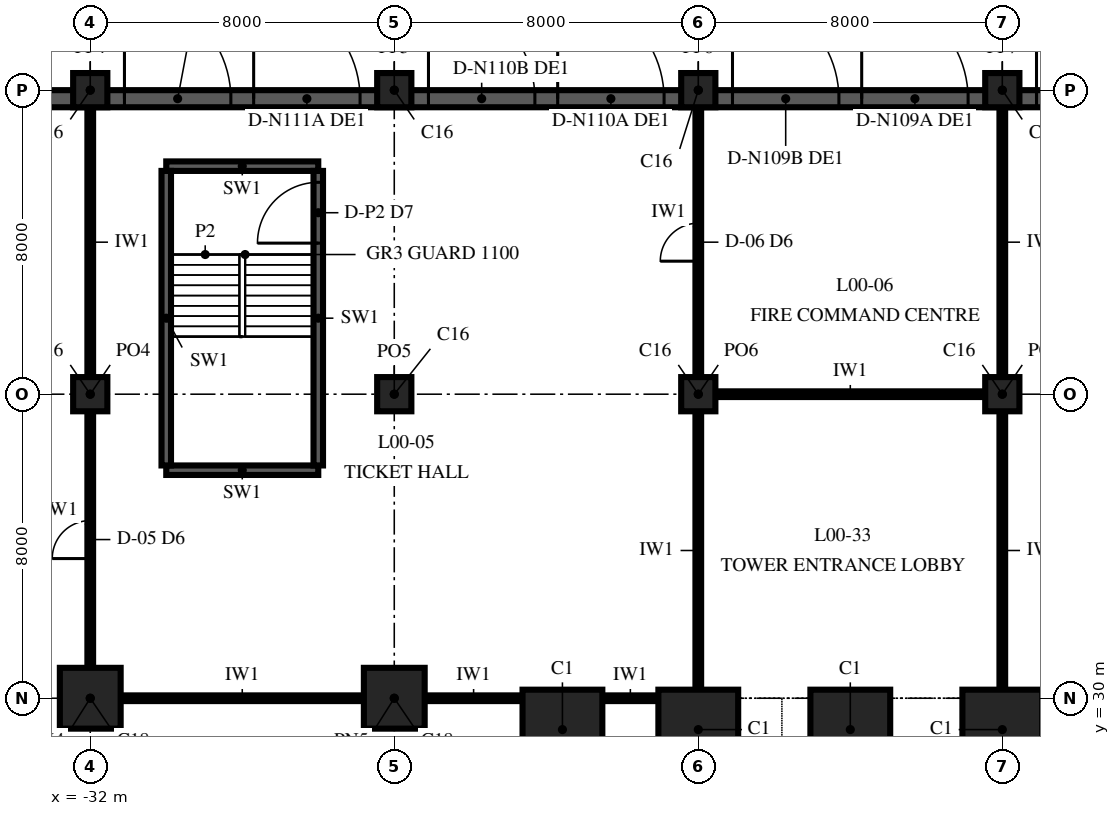
"""IFC4 building model, lengths in metres.
Left out: names, types, materials, properties, quantities, classifications, styles, units other than length and angle.
Written with IfcOpenShell. Run it as: python <this file> out.ifc"""

import sys

from ifc_helpers import new_model, si_unit, direction, frame, frame_2d, origin, origin_2d, place, context, subcontext, project, spatial, rectangle, extrude, element, fill, save


model = new_model("IFC4")
c1 = context("Model", 3, precision=1e-05, world=origin(), true_north=direction((0.0, 1.0)))
c2 = subcontext(c1, "Body", "Model", "MODEL_VIEW")
j1 = project(units=[si_unit("LENGTHUNIT", "METRE"), si_unit("PLANEANGLEUNIT", "RADIAN")], contexts=[c1])
p1 = place(None, origin())
s1 = spatial("IfcSite", under=j1, at=p1, CompositionType="ELEMENT")
p2 = place(p1, origin())
s2 = spatial("IfcBuilding", under=s1, at=p2, CompositionType="ELEMENT")
p3 = place(p2, origin())
s3 = spatial("IfcBuildingStorey", under=s2, at=p3, CompositionType="ELEMENT", Elevation=0.0)
for number, where, z_axis, x_axis in (
    (1, (-8.0, 29.175, 0.0), (0.0, 0.0, 1.0), (-1.0, 0.0, 0.0)),
    (2, (-12.0, 29.175, 0.0), (0.0, 0.0, 1.0), (-1.0, 0.0, 0.0)),
    (3, (-16.0, 29.175, 0.0), (0.0, 0.0, 1.0), (-1.0, 0.0, 0.0)),
    (4, (-19.575, 29.175, 0.0), (0.0, 0.0, 1.0), (-1.0, 0.0, 0.0)),
):
    element("IfcColumn", number, at=place(p3, frame(where, z_axis=z_axis, x_axis=x_axis)), inside=s3, PredefinedType="COLUMN", context=c2, shape_type="SweptSolid", body=[
        extrude(rectangle(XDim=2.1, YDim=2.1, at=origin_2d()), origin(), (0.0, 0.0, 1.0), 6.0),
    ])
p4 = place(p3, frame((-32.0, 30.0, 0.0), z_axis=(0.0, 0.0, 1.0), x_axis=(1.0, 0.0, 0.0)))
e5 = element("IfcColumn", 5, at=p4, inside=s3, PredefinedType="COLUMN", context=c2, shape_type="SweptSolid", body=[
    extrude(rectangle(XDim=1.6, YDim=1.6, at=origin_2d()), origin(), (0.0, 0.0, 1.0), 6.0),
])
for number, where, z_axis, x_axis in (
    (6, (-32.0, 38.0, 0.0), (0.0, 0.0, 1.0), (1.0, 0.0, 0.0)),
    (7, (-32.0, 46.0, 0.0), (0.0, 0.0, 1.0), (1.0, 0.0, 0.0)),
):
    element("IfcColumn", number, at=place(p3, frame(where, z_axis=z_axis, x_axis=x_axis)), inside=s3, PredefinedType="COLUMN", context=c2, shape_type="SweptSolid", body=[
        extrude(rectangle(XDim=0.9, YDim=0.9, at=origin_2d()), origin(), (0.0, 0.0, 1.0), 6.0),
    ])
p5 = place(p3, frame((-24.0, 30.0, 0.0), z_axis=(0.0, 0.0, 1.0), x_axis=(1.0, 0.0, 0.0)))
e8 = element("IfcColumn", 8, at=p5, inside=s3, PredefinedType="COLUMN", context=c2, shape_type="SweptSolid", body=[
    extrude(rectangle(XDim=1.6, YDim=1.6, at=origin_2d()), origin(), (0.0, 0.0, 1.0), 6.0),
])
for number, where, z_axis, x_axis in (
    (9, (-24.0, 38.0, 0.0), (0.0, 0.0, 1.0), (1.0, 0.0, 0.0)),
    (10, (-24.0, 46.0, 0.0), (0.0, 0.0, 1.0), (1.0, 0.0, 0.0)),
    (11, (-16.0, 38.0, 0.0), (0.0, 0.0, 1.0), (1.0, 0.0, 0.0)),
    (12, (-16.0, 46.0, 0.0), (0.0, 0.0, 1.0), (1.0, 0.0, 0.0)),
    (13, (-8.0, 38.0, 0.0), (0.0, 0.0, 1.0), (1.0, 0.0, 0.0)),
    (14, (-8.0, 46.0, 0.0), (0.0, 0.0, 1.0), (1.0, 0.0, 0.0)),
):
    element("IfcColumn", number, at=place(p3, frame(where, z_axis=z_axis, x_axis=x_axis)), inside=s3, PredefinedType="COLUMN", context=c2, shape_type="SweptSolid", body=[
        extrude(rectangle(XDim=0.9, YDim=0.9, at=origin_2d()), origin(), (0.0, 0.0, 1.0), 6.0),
    ])
p6 = place(p3, frame((56.0, 45.775, 0.0), z_axis=(0.0, 0.0, 1.0), x_axis=(-1.0, 0.0, 0.0)))
e15 = element("IfcWall", 15, at=p6, inside=s3, PredefinedType="SOLIDWALL", context=c2, shape_type="SweptSolid", body=[
    extrude(rectangle(XDim=90.0, YDim=0.45, at=frame_2d((45.0, 0.0))), origin(), (0.0, 0.0, 1.0), 6.0),
])
p7 = place(p6, frame((0.9, 0.0, 0.0)))
e16 = element("IfcOpeningElement", 16, at=p7, cuts=e15, PredefinedType="OPENING", context=c2, shape_type="SweptSolid", body=[
    extrude(rectangle(XDim=2.8, YDim=2.4, at=frame_2d((1.4, 1.2))), frame((0.0, 0.24, 0.0), z_axis=(0.0, -1.0, 0.0), x_axis=(1.0, 0.0, 0.0)), (0.0, 0.0, 1.0), 0.48),
])
p8 = place(p6, frame((4.3, 0.0, 0.0)))
e17 = element("IfcOpeningElement", 17, at=p8, cuts=e15, PredefinedType="OPENING", context=c2, shape_type="SweptSolid", body=[
    extrude(rectangle(XDim=2.8, YDim=2.4, at=frame_2d((1.4, 1.2))), frame((0.0, 0.24, 0.0), z_axis=(0.0, -1.0, 0.0), x_axis=(1.0, 0.0, 0.0)), (0.0, 0.0, 1.0), 0.48),
])
p9 = place(p6, frame((8.9, 0.0, 0.0)))
e18 = element("IfcOpeningElement", 18, at=p9, cuts=e15, PredefinedType="OPENING", context=c2, shape_type="SweptSolid", body=[
    extrude(rectangle(XDim=2.8, YDim=2.4, at=frame_2d((1.4, 1.2))), frame((0.0, 0.24, 0.0), z_axis=(0.0, -1.0, 0.0), x_axis=(1.0, 0.0, 0.0)), (0.0, 0.0, 1.0), 0.48),
])
p10 = place(p6, frame((12.3, 0.0, 0.0)))
e19 = element("IfcOpeningElement", 19, at=p10, cuts=e15, PredefinedType="OPENING", context=c2, shape_type="SweptSolid", body=[
    extrude(rectangle(XDim=2.8, YDim=2.4, at=frame_2d((1.4, 1.2))), frame((0.0, 0.24, 0.0), z_axis=(0.0, -1.0, 0.0), x_axis=(1.0, 0.0, 0.0)), (0.0, 0.0, 1.0), 0.48),
])
p11 = place(p6, frame((16.9, 0.0, 0.0)))
e20 = element("IfcOpeningElement", 20, at=p11, cuts=e15, PredefinedType="OPENING", context=c2, shape_type="SweptSolid", body=[
    extrude(rectangle(XDim=2.8, YDim=2.4, at=frame_2d((1.4, 1.2))), frame((0.0, 0.24, 0.0), z_axis=(0.0, -1.0, 0.0), x_axis=(1.0, 0.0, 0.0)), (0.0, 0.0, 1.0), 0.48),
])
p12 = place(p6, frame((20.3, 0.0, 0.0)))
e21 = element("IfcOpeningElement", 21, at=p12, cuts=e15, PredefinedType="OPENING", context=c2, shape_type="SweptSolid", body=[
    extrude(rectangle(XDim=2.8, YDim=2.4, at=frame_2d((1.4, 1.2))), frame((0.0, 0.24, 0.0), z_axis=(0.0, -1.0, 0.0), x_axis=(1.0, 0.0, 0.0)), (0.0, 0.0, 1.0), 0.48),
])
p13 = place(p6, frame((24.9, 0.0, 0.0)))
e22 = element("IfcOpeningElement", 22, at=p13, cuts=e15, PredefinedType="OPENING", context=c2, shape_type="SweptSolid", body=[
    extrude(rectangle(XDim=2.8, YDim=2.4, at=frame_2d((1.4, 1.2))), frame((0.0, 0.24, 0.0), z_axis=(0.0, -1.0, 0.0), x_axis=(1.0, 0.0, 0.0)), (0.0, 0.0, 1.0), 0.48),
])
p14 = place(p6, frame((28.3, 0.0, 0.0)))
e23 = element("IfcOpeningElement", 23, at=p14, cuts=e15, PredefinedType="OPENING", context=c2, shape_type="SweptSolid", body=[
    extrude(rectangle(XDim=2.8, YDim=2.4, at=frame_2d((1.4, 1.2))), frame((0.0, 0.24, 0.0), z_axis=(0.0, -1.0, 0.0), x_axis=(1.0, 0.0, 0.0)), (0.0, 0.0, 1.0), 0.48),
])
p15 = place(p6, frame((32.9, 0.0, 0.0)))
e24 = element("IfcOpeningElement", 24, at=p15, cuts=e15, PredefinedType="OPENING", context=c2, shape_type="SweptSolid", body=[
    extrude(rectangle(XDim=2.8, YDim=2.4, at=frame_2d((1.4, 1.2))), frame((0.0, 0.24, 0.0), z_axis=(0.0, -1.0, 0.0), x_axis=(1.0, 0.0, 0.0)), (0.0, 0.0, 1.0), 0.48),
])
p16 = place(p6, frame((36.3, 0.0, 0.0)))
e25 = element("IfcOpeningElement", 25, at=p16, cuts=e15, PredefinedType="OPENING", context=c2, shape_type="SweptSolid", body=[
    extrude(rectangle(XDim=2.8, YDim=2.4, at=frame_2d((1.4, 1.2))), frame((0.0, 0.24, 0.0), z_axis=(0.0, -1.0, 0.0), x_axis=(1.0, 0.0, 0.0)), (0.0, 0.0, 1.0), 0.48),
])
p17 = place(p6, frame((40.9, 0.0, 0.0)))
e26 = element("IfcOpeningElement", 26, at=p17, cuts=e15, PredefinedType="OPENING", context=c2, shape_type="SweptSolid", body=[
    extrude(rectangle(XDim=2.8, YDim=2.4, at=frame_2d((1.4, 1.2))), frame((0.0, 0.24, 0.0), z_axis=(0.0, -1.0, 0.0), x_axis=(1.0, 0.0, 0.0)), (0.0, 0.0, 1.0), 0.48),
])
p18 = place(p6, frame((44.3, 0.0, 0.0)))
e27 = element("IfcOpeningElement", 27, at=p18, cuts=e15, PredefinedType="OPENING", context=c2, shape_type="SweptSolid", body=[
    extrude(rectangle(XDim=2.8, YDim=2.4, at=frame_2d((1.4, 1.2))), frame((0.0, 0.24, 0.0), z_axis=(0.0, -1.0, 0.0), x_axis=(1.0, 0.0, 0.0)), (0.0, 0.0, 1.0), 0.48),
])
p19 = place(p6, frame((48.9, 0.0, 0.0)))
e28 = element("IfcOpeningElement", 28, at=p19, cuts=e15, PredefinedType="OPENING", context=c2, shape_type="SweptSolid", body=[
    extrude(rectangle(XDim=2.8, YDim=2.4, at=frame_2d((1.4, 1.2))), frame((0.0, 0.24, 0.0), z_axis=(0.0, -1.0, 0.0), x_axis=(1.0, 0.0, 0.0)), (0.0, 0.0, 1.0), 0.48),
])
p20 = place(p6, frame((52.3, 0.0, 0.0)))
e29 = element("IfcOpeningElement", 29, at=p20, cuts=e15, PredefinedType="OPENING", context=c2, shape_type="SweptSolid", body=[
    extrude(rectangle(XDim=2.8, YDim=2.4, at=frame_2d((1.4, 1.2))), frame((0.0, 0.24, 0.0), z_axis=(0.0, -1.0, 0.0), x_axis=(1.0, 0.0, 0.0)), (0.0, 0.0, 1.0), 0.48),
])
p21 = place(p6, frame((56.9, 0.0, 0.0)))
e30 = element("IfcOpeningElement", 30, at=p21, cuts=e15, PredefinedType="OPENING", context=c2, shape_type="SweptSolid", body=[
    extrude(rectangle(XDim=2.8, YDim=2.4, at=frame_2d((1.4, 1.2))), frame((0.0, 0.24, 0.0), z_axis=(0.0, -1.0, 0.0), x_axis=(1.0, 0.0, 0.0)), (0.0, 0.0, 1.0), 0.48),
])
p22 = place(p6, frame((60.3, 0.0, 0.0)))
e31 = element("IfcOpeningElement", 31, at=p22, cuts=e15, PredefinedType="OPENING", context=c2, shape_type="SweptSolid", body=[
    extrude(rectangle(XDim=2.8, YDim=2.4, at=frame_2d((1.4, 1.2))), frame((0.0, 0.24, 0.0), z_axis=(0.0, -1.0, 0.0), x_axis=(1.0, 0.0, 0.0)), (0.0, 0.0, 1.0), 0.48),
])
p23 = place(p6, frame((64.9, 0.0, 0.0)))
e32 = element("IfcOpeningElement", 32, at=p23, cuts=e15, PredefinedType="OPENING", context=c2, shape_type="SweptSolid", body=[
    extrude(rectangle(XDim=2.8, YDim=2.4, at=frame_2d((1.4, 1.2))), frame((0.0, 0.24, 0.0), z_axis=(0.0, -1.0, 0.0), x_axis=(1.0, 0.0, 0.0)), (0.0, 0.0, 1.0), 0.48),
])
p24 = place(p6, frame((68.3, 0.0, 0.0)))
e33 = element("IfcOpeningElement", 33, at=p24, cuts=e15, PredefinedType="OPENING", context=c2, shape_type="SweptSolid", body=[
    extrude(rectangle(XDim=2.8, YDim=2.4, at=frame_2d((1.4, 1.2))), frame((0.0, 0.24, 0.0), z_axis=(0.0, -1.0, 0.0), x_axis=(1.0, 0.0, 0.0)), (0.0, 0.0, 1.0), 0.48),
])
p25 = place(p6, frame((72.9, 0.0, 0.0)))
e34 = element("IfcOpeningElement", 34, at=p25, cuts=e15, PredefinedType="OPENING", context=c2, shape_type="SweptSolid", body=[
    extrude(rectangle(XDim=2.8, YDim=2.4, at=frame_2d((1.4, 1.2))), frame((0.0, 0.24, 0.0), z_axis=(0.0, -1.0, 0.0), x_axis=(1.0, 0.0, 0.0)), (0.0, 0.0, 1.0), 0.48),
])
p26 = place(p6, frame((76.3, 0.0, 0.0)))
e35 = element("IfcOpeningElement", 35, at=p26, cuts=e15, PredefinedType="OPENING", context=c2, shape_type="SweptSolid", body=[
    extrude(rectangle(XDim=2.8, YDim=2.4, at=frame_2d((1.4, 1.2))), frame((0.0, 0.24, 0.0), z_axis=(0.0, -1.0, 0.0), x_axis=(1.0, 0.0, 0.0)), (0.0, 0.0, 1.0), 0.48),
])
p27 = place(p6, frame((80.9, 0.0, 0.0)))
e36 = element("IfcOpeningElement", 36, at=p27, cuts=e15, PredefinedType="OPENING", context=c2, shape_type="SweptSolid", body=[
    extrude(rectangle(XDim=2.8, YDim=2.4, at=frame_2d((1.4, 1.2))), frame((0.0, 0.24, 0.0), z_axis=(0.0, -1.0, 0.0), x_axis=(1.0, 0.0, 0.0)), (0.0, 0.0, 1.0), 0.48),
])
p28 = place(p6, frame((84.3, 0.0, 0.0)))
e37 = element("IfcOpeningElement", 37, at=p28, cuts=e15, PredefinedType="OPENING", context=c2, shape_type="SweptSolid", body=[
    extrude(rectangle(XDim=2.8, YDim=2.4, at=frame_2d((1.4, 1.2))), frame((0.0, 0.24, 0.0), z_axis=(0.0, -1.0, 0.0), x_axis=(1.0, 0.0, 0.0)), (0.0, 0.0, 1.0), 0.48),
])
for number, where, z_axis, x_axis in (
    (38, (-30.0, 36.0, 0.0), (0.0, 0.0, 1.0), (1.0, 0.0, 0.0)),
    (39, (-26.0, 44.0, 0.0), (0.0, 0.0, 1.0), (-1.0, 0.0, 0.0)),
):
    element("IfcWall", number, at=place(p3, frame(where, z_axis=z_axis, x_axis=x_axis)), inside=s3, PredefinedType="SOLIDWALL", context=c2, shape_type="SweptSolid", body=[
        extrude(rectangle(XDim=4.0, YDim=0.25, at=frame_2d((2.0, 0.0))), origin(), (0.0, 0.0, 1.0), 6.0),
    ])
p29 = place(p3, frame((-26.0, 36.125, 0.0), z_axis=(0.0, 0.0, 1.0), x_axis=(0.0, 1.0, 0.0)))
e40 = element("IfcWall", 40, at=p29, inside=s3, PredefinedType="SOLIDWALL", context=c2, shape_type="SweptSolid", body=[
    extrude(rectangle(XDim=7.75, YDim=0.25, at=frame_2d((3.875, 0.0))), origin(), (0.0, 0.0, 1.0), 6.0),
])
p30 = place(p29, frame((5.85, 0.0, 0.0)))
e41 = element("IfcOpeningElement", 41, at=p30, cuts=e40, PredefinedType="OPENING", context=c2, shape_type="SweptSolid", body=[
    extrude(rectangle(XDim=1.6, YDim=2.1, at=frame_2d((0.8, 1.05))), frame((0.0, 0.14, 0.0), z_axis=(0.0, -1.0, 0.0), x_axis=(1.0, 0.0, 0.0)), (0.0, 0.0, 1.0), 0.28),
])
p31 = place(p3, frame((-30.0, 43.875, 0.0), z_axis=(0.0, 0.0, 1.0), x_axis=(0.0, -1.0, 0.0)))
e42 = element("IfcWall", 42, at=p31, inside=s3, PredefinedType="SOLIDWALL", context=c2, shape_type="SweptSolid", body=[
    extrude(rectangle(XDim=7.75, YDim=0.25, at=frame_2d((3.875, 0.0))), origin(), (0.0, 0.0, 1.0), 6.0),
])
p32 = place(p3, frame((-32.0, 30.81, 0.0), z_axis=(0.0, 0.0, 1.0), x_axis=(0.0, 1.0, 0.0)))
e43 = element("IfcWall", 43, at=p32, inside=s3, PredefinedType="PARTITIONING", context=c2, shape_type="SweptSolid", body=[
    extrude(rectangle(XDim=6.73, YDim=0.15, at=frame_2d((3.365, 0.0))), origin(), (0.0, 0.0, 1.0), 5.05),
])
p33 = place(p32, frame((2.865, 0.0, 0.0)))
e44 = element("IfcOpeningElement", 44, at=p33, cuts=e43, PredefinedType="OPENING", context=c2, shape_type="SweptSolid", body=[
    extrude(rectangle(XDim=1.0, YDim=2.1, at=frame_2d((0.5, 1.05))), frame((0.0, 0.09, 0.0), z_axis=(0.0, -1.0, 0.0), x_axis=(1.0, 0.0, 0.0)), (0.0, 0.0, 1.0), 0.18),
])
p34 = place(p3, frame((-32.0, 38.46, 0.0), z_axis=(0.0, 0.0, 1.0), x_axis=(0.0, 1.0, 0.0)))
e45 = element("IfcWall", 45, at=p34, inside=s3, PredefinedType="PARTITIONING", context=c2, shape_type="SweptSolid", body=[
    extrude(rectangle(XDim=7.08, YDim=0.15, at=frame_2d((3.54, 0.0))), origin(), (0.0, 0.0, 1.0), 5.05),
])
p35 = place(p3, frame((-16.0, 30.235, 0.0), z_axis=(0.0, 0.0, 1.0), x_axis=(0.0, 1.0, 0.0)))
e46 = element("IfcWall", 46, at=p35, inside=s3, PredefinedType="PARTITIONING", context=c2, shape_type="SweptSolid", body=[
    extrude(rectangle(XDim=7.305, YDim=0.15, at=frame_2d((3.652, 0.0))), origin(), (0.0, 0.0, 1.0), 5.7),
])
p36 = place(p3, frame((-16.0, 38.46, 0.0), z_axis=(0.0, 0.0, 1.0), x_axis=(0.0, 1.0, 0.0)))
e47 = element("IfcWall", 47, at=p36, inside=s3, PredefinedType="PARTITIONING", context=c2, shape_type="SweptSolid", body=[
    extrude(rectangle(XDim=7.08, YDim=0.15, at=frame_2d((3.54, 0.0))), origin(), (0.0, 0.0, 1.0), 5.05),
])
p37 = place(p36, frame((3.04, 0.0, 0.0)))
e48 = element("IfcOpeningElement", 48, at=p37, cuts=e47, PredefinedType="OPENING", context=c2, shape_type="SweptSolid", body=[
    extrude(rectangle(XDim=1.0, YDim=2.1, at=frame_2d((0.5, 1.05))), frame((0.0, 0.09, 0.0), z_axis=(0.0, -1.0, 0.0), x_axis=(1.0, 0.0, 0.0)), (0.0, 0.0, 1.0), 0.18),
])
p38 = place(p3, frame((-31.19, 30.0, 0.0), z_axis=(0.0, 0.0, 1.0), x_axis=(1.0, 0.0, 0.0)))
e49 = element("IfcWall", 49, at=p38, inside=s3, PredefinedType="PARTITIONING", context=c2, shape_type="SweptSolid", body=[
    extrude(rectangle(XDim=6.38, YDim=0.15, at=frame_2d((3.19, 0.0))), origin(), (0.0, 0.0, 1.0), 5.05),
])
p39 = place(p3, frame((-23.19, 30.0, 0.0), z_axis=(0.0, 0.0, 1.0), x_axis=(1.0, 0.0, 0.0)))
e50 = element("IfcWall", 50, at=p39, inside=s3, PredefinedType="PARTITIONING", context=c2, shape_type="SweptSolid", body=[
    extrude(rectangle(XDim=2.555, YDim=0.15, at=frame_2d((1.277, 0.0))), origin(), (0.0, 0.0, 1.0), 5.7),
])
p40 = place(p3, frame((-18.515, 30.0, 0.0), z_axis=(0.0, 0.0, 1.0), x_axis=(1.0, 0.0, 0.0)))
e51 = element("IfcWall", 51, at=p40, inside=s3, PredefinedType="PARTITIONING", context=c2, shape_type="SweptSolid", body=[
    extrude(rectangle(XDim=1.455, YDim=0.15, at=frame_2d((0.728, 0.0))), origin(), (0.0, 0.0, 1.0), 5.7),
])
p41 = place(p3, frame((-15.54, 38.0, 0.0), z_axis=(0.0, 0.0, 1.0), x_axis=(1.0, 0.0, 0.0)))
e52 = element("IfcWall", 52, at=p41, inside=s3, PredefinedType="PARTITIONING", context=c2, shape_type="SweptSolid", body=[
    extrude(rectangle(XDim=7.08, YDim=0.15, at=frame_2d((3.54, 0.0))), origin(), (0.0, 0.0, 1.0), 5.05),
])
p42 = place(p3, frame((-8.0, 30.235, 0.0), z_axis=(0.0, 0.0, 1.0), x_axis=(0.0, 1.0, 0.0)))
e53 = element("IfcWall", 53, at=p42, inside=s3, PredefinedType="PARTITIONING", context=c2, shape_type="SweptSolid", body=[
    extrude(rectangle(XDim=7.305, YDim=0.15, at=frame_2d((3.652, 0.0))), origin(), (0.0, 0.0, 1.0), 5.7),
])
p43 = place(p3, frame((-8.0, 38.46, 0.0), z_axis=(0.0, 0.0, 1.0), x_axis=(0.0, 1.0, 0.0)))
e54 = element("IfcWall", 54, at=p43, inside=s3, PredefinedType="PARTITIONING", context=c2, shape_type="SweptSolid", body=[
    extrude(rectangle(XDim=7.08, YDim=0.15, at=frame_2d((3.54, 0.0))), origin(), (0.0, 0.0, 1.0), 5.05),
])
p44 = place(p22, frame((2.8, 0.0, 0.0), z_axis=(0.0, 0.0, 1.0), x_axis=(-1.0, 0.0, 0.0)))
e55 = element("IfcDoor", 55, at=p44, inside=s3, OperationType="DOUBLE_DOOR_SINGLE_SWING", PredefinedType="DOOR", context=c2, shape_type="SweptSolid", body=[
    extrude(rectangle(XDim=2.8, YDim=2.4, at=frame_2d((1.4, 1.2))), frame((0.0, 0.225, 0.0), z_axis=(0.0, -1.0, 0.0), x_axis=(1.0, 0.0, 0.0)), (0.0, 0.0, 1.0), 0.449),
])
fill(e31, e55)
p45 = place(p23, frame((2.8, 0.0, 0.0), z_axis=(0.0, 0.0, 1.0), x_axis=(-1.0, 0.0, 0.0)))
e56 = element("IfcDoor", 56, at=p45, inside=s3, OperationType="DOUBLE_DOOR_SINGLE_SWING", PredefinedType="DOOR", context=c2, shape_type="SweptSolid", body=[
    extrude(rectangle(XDim=2.8, YDim=2.4, at=frame_2d((1.4, 1.2))), frame((0.0, 0.225, 0.0), z_axis=(0.0, -1.0, 0.0), x_axis=(1.0, 0.0, 0.0)), (0.0, 0.0, 1.0), 0.449),
])
fill(e32, e56)
p46 = place(p24, frame((2.8, 0.0, 0.0), z_axis=(0.0, 0.0, 1.0), x_axis=(-1.0, 0.0, 0.0)))
e57 = element("IfcDoor", 57, at=p46, inside=s3, OperationType="DOUBLE_DOOR_SINGLE_SWING", PredefinedType="DOOR", context=c2, shape_type="SweptSolid", body=[
    extrude(rectangle(XDim=2.8, YDim=2.4, at=frame_2d((1.4, 1.2))), frame((0.0, 0.225, 0.0), z_axis=(0.0, -1.0, 0.0), x_axis=(1.0, 0.0, 0.0)), (0.0, 0.0, 1.0), 0.449),
])
fill(e33, e57)
p47 = place(p25, frame((2.8, 0.0, 0.0), z_axis=(0.0, 0.0, 1.0), x_axis=(-1.0, 0.0, 0.0)))
e58 = element("IfcDoor", 58, at=p47, inside=s3, OperationType="DOUBLE_DOOR_SINGLE_SWING", PredefinedType="DOOR", context=c2, shape_type="SweptSolid", body=[
    extrude(rectangle(XDim=2.8, YDim=2.4, at=frame_2d((1.4, 1.2))), frame((0.0, 0.225, 0.0), z_axis=(0.0, -1.0, 0.0), x_axis=(1.0, 0.0, 0.0)), (0.0, 0.0, 1.0), 0.449),
])
fill(e34, e58)
p48 = place(p26, frame((2.8, 0.0, 0.0), z_axis=(0.0, 0.0, 1.0), x_axis=(-1.0, 0.0, 0.0)))
e59 = element("IfcDoor", 59, at=p48, inside=s3, OperationType="DOUBLE_DOOR_SINGLE_SWING", PredefinedType="DOOR", context=c2, shape_type="SweptSolid", body=[
    extrude(rectangle(XDim=2.8, YDim=2.4, at=frame_2d((1.4, 1.2))), frame((0.0, 0.225, 0.0), z_axis=(0.0, -1.0, 0.0), x_axis=(1.0, 0.0, 0.0)), (0.0, 0.0, 1.0), 0.449),
])
fill(e35, e59)
p49 = place(p27, frame((2.8, 0.0, 0.0), z_axis=(0.0, 0.0, 1.0), x_axis=(-1.0, 0.0, 0.0)))
e60 = element("IfcDoor", 60, at=p49, inside=s3, OperationType="DOUBLE_DOOR_SINGLE_SWING", PredefinedType="DOOR", context=c2, shape_type="SweptSolid", body=[
    extrude(rectangle(XDim=2.8, YDim=2.4, at=frame_2d((1.4, 1.2))), frame((0.0, 0.225, 0.0), z_axis=(0.0, -1.0, 0.0), x_axis=(1.0, 0.0, 0.0)), (0.0, 0.0, 1.0), 0.449),
])
fill(e36, e60)
p50 = place(p28, frame((2.8, 0.0, 0.0), z_axis=(0.0, 0.0, 1.0), x_axis=(-1.0, 0.0, 0.0)))
e61 = element("IfcDoor", 61, at=p50, inside=s3, OperationType="DOUBLE_DOOR_SINGLE_SWING", PredefinedType="DOOR", context=c2, shape_type="SweptSolid", body=[
    extrude(rectangle(XDim=2.8, YDim=2.4, at=frame_2d((1.4, 1.2))), frame((0.0, 0.225, 0.0), z_axis=(0.0, -1.0, 0.0), x_axis=(1.0, 0.0, 0.0)), (0.0, 0.0, 1.0), 0.449),
])
fill(e37, e61)
p51 = place(p30, origin())
e62 = element("IfcDoor", 62, at=p51, inside=s3, OperationType="DOUBLE_DOOR_SINGLE_SWING", PredefinedType="DOOR", context=c2, shape_type="SweptSolid", body=[
    extrude(rectangle(XDim=1.6, YDim=2.1, at=frame_2d((0.8, 1.05))), frame((0.0, 0.125, 0.0), z_axis=(0.0, -1.0, 0.0), x_axis=(1.0, 0.0, 0.0)), (0.0, 0.0, 1.0), 0.25),
])
fill(e41, e62)
p52 = place(p33, origin())
e63 = element("IfcDoor", 63, at=p52, inside=s3, OperationType="SINGLE_SWING_LEFT", PredefinedType="DOOR", context=c2, shape_type="SweptSolid", body=[
    extrude(rectangle(XDim=1.0, YDim=2.1, at=frame_2d((0.5, 1.05))), frame((0.0, 0.075, 0.0), z_axis=(0.0, -1.0, 0.0), x_axis=(1.0, 0.0, 0.0)), (0.0, 0.0, 1.0), 0.149),
])
fill(e44, e63)
p53 = place(p37, origin())
e64 = element("IfcDoor", 64, at=p53, inside=s3, OperationType="SINGLE_SWING_LEFT", PredefinedType="DOOR", context=c2, shape_type="SweptSolid", body=[
    extrude(rectangle(XDim=1.0, YDim=2.1, at=frame_2d((0.5, 1.05))), frame((0.0, 0.075, 0.0), z_axis=(0.0, -1.0, 0.0), x_axis=(1.0, 0.0, 0.0)), (0.0, 0.0, 1.0), 0.149),
])
fill(e48, e64)
save(model, sys.argv[1])
